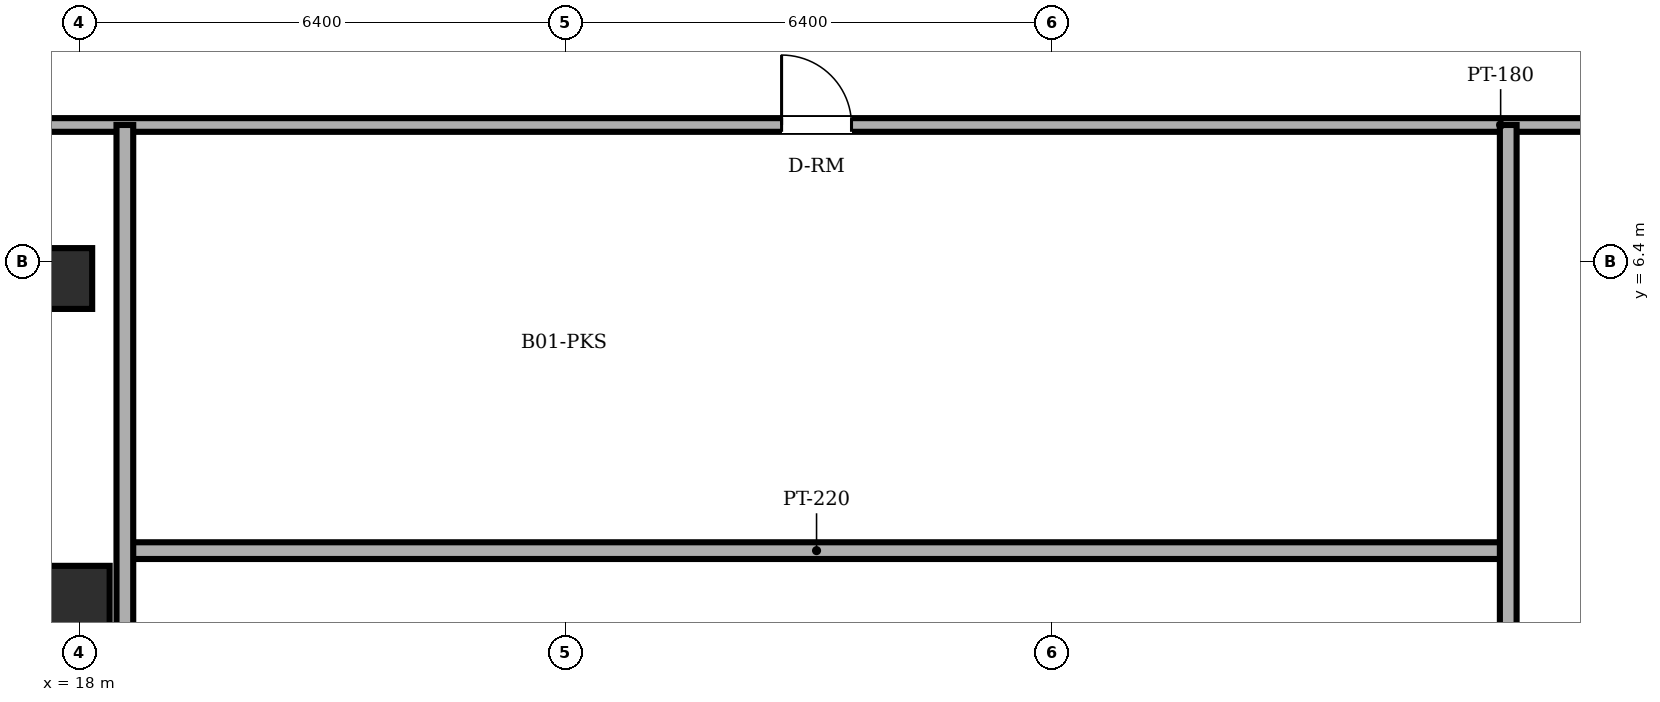
"""IFC4 building model, lengths in metres.
Left out: names, types, materials, properties, quantities, classifications, styles, units other than length and angle.
Written with IfcOpenShell. Run it as: python <this file> out.ifc"""

import sys

from ifc_helpers import new_model, si_unit, direction, frame, frame_2d, origin, origin_2d, place, context, subcontext, project, spatial, rectangle, extrude, element, fill, save


model = new_model("IFC4")
c1 = context("Model", 3, precision=1e-05, world=origin(), true_north=direction((0.0, 1.0)))
c2 = subcontext(c1, "Body", "Model", "MODEL_VIEW")
j1 = project(units=[si_unit("LENGTHUNIT", "METRE"), si_unit("PLANEANGLEUNIT", "RADIAN")], contexts=[c1])
p1 = place(None, origin())
s1 = spatial("IfcSite", under=j1, at=p1, CompositionType="ELEMENT")
p2 = place(p1, origin())
s2 = spatial("IfcBuilding", under=s1, at=p2, CompositionType="ELEMENT")
p3 = place(p2, frame((0.0, 0.0, -4.2)))
s3 = spatial("IfcBuildingStorey", under=s2, at=p3, CompositionType="ELEMENT", Elevation=-4.2)
for number, where, z_axis, x_axis in (
    (1, (18.0, 2.0, 0.0), (0.0, 0.0, 1.0), (1.0, 0.0, 0.0)),
    (2, (17.77, 6.18, 0.0), (0.0, 0.0, 1.0), (1.0, 0.0, 0.0)),
):
    element("IfcColumn", number, at=place(p3, frame(where, z_axis=z_axis, x_axis=x_axis)), inside=s3, PredefinedType="COLUMN", context=c2, shape_type="SweptSolid", body=[
        extrude(rectangle(XDim=0.8, YDim=0.8, at=origin_2d()), origin(), (0.0, 0.0, 1.0), 4.2),
    ])
p4 = place(p3, frame((18.6, 2.6, 0.0), z_axis=(0.0, 0.0, 1.0), x_axis=(1.0, 0.0, 0.0)))
e3 = element("IfcWall", 3, at=p4, inside=s3, PredefinedType="PARTITIONING", context=c2, shape_type="SweptSolid", body=[
    extrude(rectangle(XDim=18.2, YDim=0.22, at=frame_2d((9.1, 0.0))), origin(), (0.0, 0.0, 1.0), 3.96),
])
p5 = place(p3, frame((8.5, 8.2, 0.0), z_axis=(0.0, 0.0, 1.0), x_axis=(1.0, 0.0, 0.0)))
e4 = element("IfcWall", 4, at=p5, inside=s3, PredefinedType="PARTITIONING", context=c2, shape_type="SweptSolid", body=[
    extrude(rectangle(XDim=56.4, YDim=0.18, at=frame_2d((28.2, 0.0))), origin(), (0.0, 0.0, 1.0), 3.96),
])
p6 = place(p5, frame((18.74, 0.0, 0.0)))
e5 = element("IfcOpeningElement", 5, at=p6, cuts=e4, PredefinedType="OPENING", context=c2, shape_type="SweptSolid", body=[
    extrude(rectangle(XDim=0.92, YDim=2.1, at=frame_2d((0.46, 1.05))), frame((0.0, 0.1, 0.0), z_axis=(0.0, -1.0, 0.0), x_axis=(1.0, 0.0, 0.0)), (0.0, 0.0, 1.0), 0.2),
])
p7 = place(p3, frame((18.6, 0.0, 0.0), z_axis=(0.0, 0.0, 1.0), x_axis=(0.0, 1.0, 0.0)))
e6 = element("IfcWall", 6, at=p7, inside=s3, PredefinedType="PARTITIONING", context=c2, shape_type="SweptSolid", body=[
    extrude(rectangle(XDim=8.2, YDim=0.22, at=frame_2d((4.1, 0.0))), origin(), (0.0, 0.0, 1.0), 2.742),
])
p8 = place(p3, frame((36.8, 0.0, 0.0), z_axis=(0.0, 0.0, 1.0), x_axis=(0.0, 1.0, 0.0)))
e7 = element("IfcWall", 7, at=p8, inside=s3, PredefinedType="PARTITIONING", context=c2, shape_type="SweptSolid", body=[
    extrude(rectangle(XDim=8.2, YDim=0.22, at=frame_2d((4.1, 0.0))), origin(), (0.0, 0.0, 1.0), 3.96),
])
p9 = place(p6, origin())
e8 = element("IfcDoor", 8, at=p9, inside=s3, OperationType="SINGLE_SWING_LEFT", PredefinedType="DOOR", context=c2, shape_type="SweptSolid", body=[
    extrude(rectangle(XDim=0.92, YDim=2.1, at=frame_2d((0.46, 1.05))), frame((0.0, 0.025, 0.0), z_axis=(0.0, -1.0, 0.0), x_axis=(1.0, 0.0, 0.0)), (0.0, 0.0, 1.0), 0.05),
])
fill(e5, e8)
save(model, sys.argv[1])
